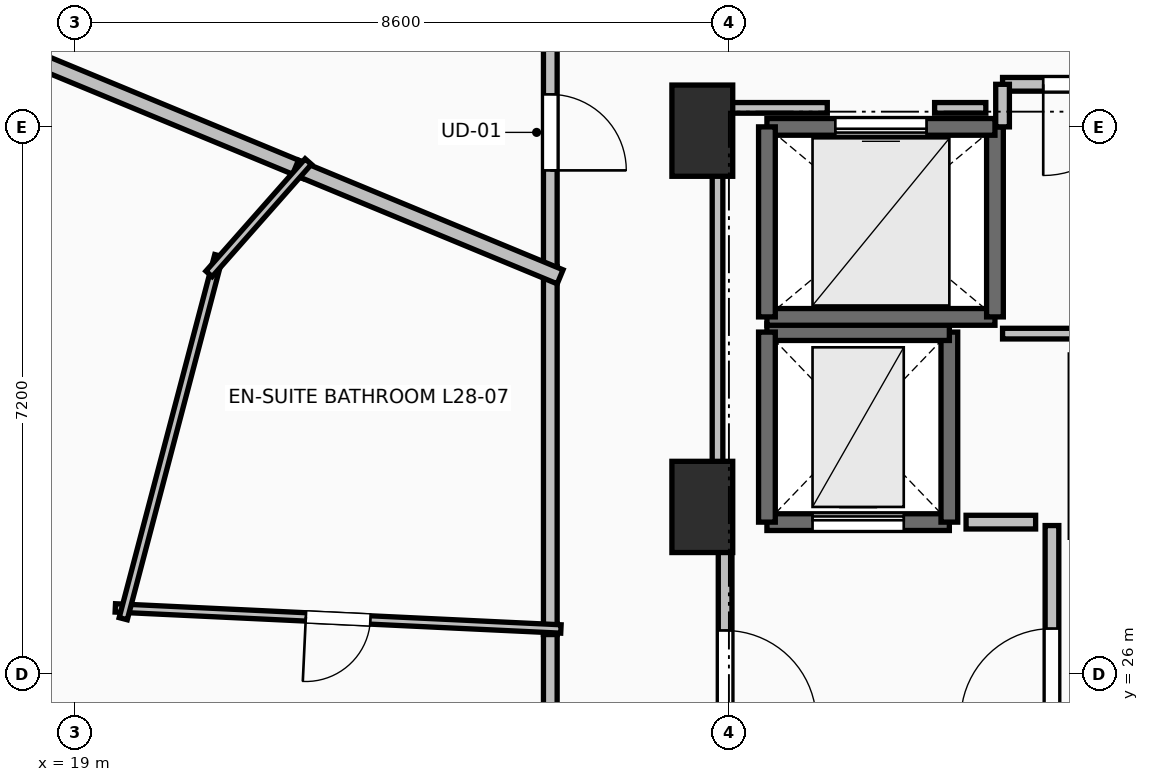
"""IFC4 building model, lengths in metres.
Left out: names, types, materials, properties, quantities, classifications, styles, units other than length and angle.
Written with IfcOpenShell. Run it as: python <this file> out.ifc"""

import sys

from ifc_helpers import new_model, si_unit, direction, frame, frame_2d, origin, origin_2d, place, context, subcontext, project, spatial, rectangle, extrude, element, fill, save


model = new_model("IFC4")
c1 = context("Model", 3, precision=1e-05, world=origin(), true_north=direction((0.0, 1.0)))
c2 = subcontext(c1, "Body", "Model", "MODEL_VIEW")
j1 = project(units=[si_unit("LENGTHUNIT", "METRE"), si_unit("PLANEANGLEUNIT", "RADIAN")], contexts=[c1])
p1 = place(None, origin())
s1 = spatial("IfcSite", under=j1, at=p1, CompositionType="ELEMENT")
p2 = place(p1, origin())
s2 = spatial("IfcBuilding", under=s1, at=p2, CompositionType="ELEMENT")
p3 = place(p2, frame((0.0, 0.0, 106.8)))
s3 = spatial("IfcBuildingStorey", under=s2, at=p3, CompositionType="ELEMENT", Elevation=106.8)
for number, where, z_axis, x_axis in (
    (1, (27.25, 28.2, 0.0), (0.0, 0.0, 1.0), (1.0, 0.0, 0.0)),
    (2, (27.25, 33.15, 0.0), (0.0, 0.0, 1.0), (1.0, 0.0, 0.0)),
):
    element("IfcColumn", number, at=place(p3, frame(where, z_axis=z_axis, x_axis=x_axis)), inside=s3, PredefinedType="PILASTER", context=c2, shape_type="SweptSolid", body=[
        extrude(rectangle(XDim=0.8, YDim=1.2, at=origin_2d()), origin(), (0.0, 0.0, 1.0), 3.5),
    ])
p4 = place(p3, frame((28.1, 28.0, 0.0), z_axis=(0.0, 0.0, 1.0), x_axis=(1.0, 0.0, 0.0)))
e3 = element("IfcWall", 3, at=p4, inside=s3, PredefinedType="SHEAR", context=c2, shape_type="SweptSolid", body=[
    extrude(rectangle(XDim=2.4, YDim=0.22, at=frame_2d((1.2, 0.0))), origin(), (0.0, 0.0, 1.0), 3.24),
])
p5 = place(p4, frame((0.6, 0.0, 0.0)))
e4 = element("IfcOpeningElement", 4, at=p5, cuts=e3, PredefinedType="OPENING", context=c2, shape_type="SweptSolid", body=[
    extrude(rectangle(XDim=1.2, YDim=2.2, at=frame_2d((0.6, 1.1))), frame((0.0, 0.125, 0.0), z_axis=(0.0, -1.0, 0.0), x_axis=(1.0, 0.0, 0.0)), (0.0, 0.0, 1.0), 0.25),
])
p6 = place(p3, frame((30.5, 28.0, 0.0), z_axis=(0.0, 0.0, 1.0), x_axis=(0.0, 1.0, 0.0)))
e5 = element("IfcWall", 5, at=p6, inside=s3, PredefinedType="SHEAR", context=c2, shape_type="SweptSolid", body=[
    extrude(rectangle(XDim=2.5, YDim=0.22, at=frame_2d((1.25, 0.0))), origin(), (0.0, 0.0, 1.0), 3.24),
])
p7 = place(p3, frame((30.5, 30.5, 0.0), z_axis=(0.0, 0.0, 1.0), x_axis=(-1.0, 0.0, 0.0)))
e6 = element("IfcWall", 6, at=p7, inside=s3, PredefinedType="SHEAR", context=c2, shape_type="SweptSolid", body=[
    extrude(rectangle(XDim=2.4, YDim=0.22, at=frame_2d((1.2, 0.0))), origin(), (0.0, 0.0, 1.0), 3.24),
])
p8 = place(p3, frame((28.1, 30.5, 0.0), z_axis=(0.0, 0.0, 1.0), x_axis=(0.0, -1.0, 0.0)))
e7 = element("IfcWall", 7, at=p8, inside=s3, PredefinedType="SHEAR", context=c2, shape_type="SweptSolid", body=[
    extrude(rectangle(XDim=2.5, YDim=0.22, at=frame_2d((1.25, 0.0))), origin(), (0.0, 0.0, 1.0), 3.24),
])
p9 = place(p3, frame((28.1, 30.7, 0.0), z_axis=(0.0, 0.0, 1.0), x_axis=(1.0, 0.0, 0.0)))
e8 = element("IfcWall", 8, at=p9, inside=s3, PredefinedType="SOLIDWALL", context=c2, shape_type="SweptSolid", body=[
    extrude(rectangle(XDim=3.0, YDim=0.22, at=frame_2d((1.5, 0.0))), origin(), (0.0, 0.0, 1.0), 3.24),
])
p10 = place(p3, frame((31.1, 30.7, 0.0), z_axis=(0.0, 0.0, 1.0), x_axis=(0.0, 1.0, 0.0)))
e9 = element("IfcWall", 9, at=p10, inside=s3, PredefinedType="SOLIDWALL", context=c2, shape_type="SweptSolid", body=[
    extrude(rectangle(XDim=2.5, YDim=0.22, at=frame_2d((1.25, 0.0))), origin(), (0.0, 0.0, 1.0), 3.24),
])
p11 = place(p3, frame((31.1, 33.2, 0.0), z_axis=(0.0, 0.0, 1.0), x_axis=(-1.0, 0.0, 0.0)))
e10 = element("IfcWall", 10, at=p11, inside=s3, PredefinedType="SOLIDWALL", context=c2, shape_type="SweptSolid", body=[
    extrude(rectangle(XDim=3.0, YDim=0.22, at=frame_2d((1.5, 0.0))), origin(), (0.0, 0.0, 1.0), 3.24),
])
p12 = place(p11, frame((0.9, 0.0, 0.0)))
e11 = element("IfcOpeningElement", 11, at=p12, cuts=e10, PredefinedType="OPENING", context=c2, shape_type="SweptSolid", body=[
    extrude(rectangle(XDim=1.2, YDim=2.2, at=frame_2d((0.6, 1.1))), frame((0.0, 0.125, 0.0), z_axis=(0.0, -1.0, 0.0), x_axis=(1.0, 0.0, 0.0)), (0.0, 0.0, 1.0), 0.25),
])
p13 = place(p3, frame((28.1, 33.2, 0.0), z_axis=(0.0, 0.0, 1.0), x_axis=(0.0, -1.0, 0.0)))
e12 = element("IfcWall", 12, at=p13, inside=s3, PredefinedType="SOLIDWALL", context=c2, shape_type="SweptSolid", body=[
    extrude(rectangle(XDim=2.5, YDim=0.22, at=frame_2d((1.25, 0.0))), origin(), (0.0, 0.0, 1.0), 3.24),
])
p14 = place(p3, frame((31.85, 24.045, 0.0), z_axis=(0.0, 0.0, 1.0), x_axis=(0.0, 1.0, 0.0)))
e13 = element("IfcWall", 13, at=p14, inside=s3, PredefinedType="PARTITIONING", context=c2, shape_type="SweptSolid", body=[
    extrude(rectangle(XDim=3.91, YDim=0.18, at=frame_2d((1.955, 0.0))), origin(), (0.0, 0.0, 1.0), 3.24),
])
p15 = place(p14, frame((1.355, 0.0, 0.0)))
e14 = element("IfcOpeningElement", 14, at=p15, cuts=e13, PredefinedType="OPENING", context=c2, shape_type="SweptSolid", body=[
    extrude(rectangle(XDim=1.2, YDim=2.15, at=frame_2d((0.6, 1.075))), frame((0.0, 0.105, 0.0), z_axis=(0.0, -1.0, 0.0), x_axis=(1.0, 0.0, 0.0)), (0.0, 0.0, 1.0), 0.21),
])
p16 = place(p3, frame((27.55, 28.0, 0.0), z_axis=(0.0, 0.0, 1.0), x_axis=(0.0, -1.0, 0.0)))
e15 = element("IfcWall", 15, at=p16, inside=s3, PredefinedType="PARTITIONING", context=c2, shape_type="SweptSolid", body=[
    extrude(rectangle(XDim=4.05, YDim=0.18, at=frame_2d((2.025, 0.0))), origin(), (0.0, 0.0, 1.0), 3.24),
])
p17 = place(p16, frame((1.425, 0.0, 0.0)))
e16 = element("IfcOpeningElement", 16, at=p17, cuts=e15, PredefinedType="OPENING", context=c2, shape_type="SweptSolid", body=[
    extrude(rectangle(XDim=1.2, YDim=2.15, at=frame_2d((0.6, 1.075))), frame((0.0, 0.105, 0.0), z_axis=(0.0, -1.0, 0.0), x_axis=(1.0, 0.0, 0.0)), (0.0, 0.0, 1.0), 0.21),
])
p18 = place(p3, frame((33.47, 33.76, 0.0), z_axis=(0.0, 0.0, 1.0), x_axis=(-1.0, 0.0, 0.0)))
e17 = element("IfcWall", 17, at=p18, inside=s3, PredefinedType="PARTITIONING", context=c2, shape_type="SweptSolid", body=[
    extrude(rectangle(XDim=2.27, YDim=0.18, at=frame_2d((1.135, 0.0))), origin(), (0.0, 0.0, 1.0), 3.24),
])
p19 = place(p18, frame((0.535, 0.0, 0.0)))
e18 = element("IfcOpeningElement", 18, at=p19, cuts=e17, PredefinedType="OPENING", context=c2, shape_type="SweptSolid", body=[
    extrude(rectangle(XDim=1.2, YDim=2.15, at=frame_2d((0.6, 1.075))), frame((0.0, 0.105, 0.0), z_axis=(0.0, -1.0, 0.0), x_axis=(1.0, 0.0, 0.0)), (0.0, 0.0, 1.0), 0.21),
])
p20 = place(p3, frame((31.2, 33.76, 0.0), z_axis=(0.0, 0.0, 1.0), x_axis=(0.0, -1.0, 0.0)))
e19 = element("IfcWall", 19, at=p20, inside=s3, PredefinedType="PARTITIONING", context=c2, shape_type="SweptSolid", body=[
    extrude(rectangle(XDim=0.56, YDim=0.18, at=frame_2d((0.28, 0.0))), origin(), (0.0, 0.0, 1.0), 3.24),
])
p21 = place(p3, frame((25.25, 35.034, 0.0), z_axis=(0.0, 0.0, 1.0), x_axis=(0.0, -1.0, 0.0)))
e20 = element("IfcWall", 20, at=p21, inside=s3, PredefinedType="PARTITIONING", context=c2, shape_type="SweptSolid", body=[
    extrude(rectangle(XDim=3.813, YDim=0.18, at=frame_2d((1.906, 0.0))), origin(), (0.0, 0.0, 1.0), 2.432),
])
p22 = place(p21, frame((1.406, 0.0, 0.0)))
e21 = element("IfcOpeningElement", 21, at=p22, cuts=e20, PredefinedType="OPENING", context=c2, shape_type="SweptSolid", body=[
    extrude(rectangle(XDim=1.0, YDim=2.15, at=frame_2d((0.5, 1.075))), frame((0.0, 0.105, 0.0), z_axis=(0.0, -1.0, 0.0), x_axis=(1.0, 0.0, 0.0)), (0.0, 0.0, 1.0), 0.21),
])
p23 = place(p3, frame((25.25, 26.661, 0.0), z_axis=(0.0, 0.0, 1.0), x_axis=(0.0, -1.0, 0.0)))
e22 = element("IfcWall", 22, at=p23, inside=s3, PredefinedType="PARTITIONING", context=c2, shape_type="SweptSolid", body=[
    extrude(rectangle(XDim=6.007, YDim=0.18, at=frame_2d((3.003, 0.0))), origin(), (0.0, 0.0, 1.0), 3.24),
])
p24 = place(p23, frame((2.479, 0.0, 0.0)))
e23 = element("IfcOpeningElement", 23, at=p24, cuts=e22, PredefinedType="OPENING", context=c2, shape_type="SweptSolid", body=[
    extrude(rectangle(XDim=1.05, YDim=2.2, at=frame_2d((0.525, 1.1))), frame((0.0, 0.105, 0.0), z_axis=(0.0, -1.0, 0.0), x_axis=(1.0, 0.0, 0.0)), (0.0, 0.0, 1.0), 0.21),
])
p25 = place(p3, frame((25.25, 31.361, 0.0), z_axis=(0.0, 0.0, 1.0), x_axis=(0.0, -1.0, 0.0)))
e24 = element("IfcWall", 24, at=p25, inside=s3, PredefinedType="PARTITIONING", context=c2, shape_type="SweptSolid", body=[
    extrude(rectangle(XDim=4.84, YDim=0.18, at=frame_2d((2.42, 0.0))), origin(), (0.0, 0.0, 1.0), 2.432),
])
p26 = place(p3, frame((15.089, 35.49, 0.0), z_axis=(0.0, 0.0, 1.0), x_axis=(0.923888472039, -0.382661849723, 0.0)))
e25 = element("IfcWall", 25, at=p26, inside=s3, PredefinedType="PARTITIONING", context=c2, shape_type="SweptSolid", body=[
    extrude(rectangle(XDim=7.51, YDim=0.2, at=frame_2d((3.755, 0.0))), origin(), (0.0, 0.0, 1.0), 2.677),
])
p27 = place(p3, frame((21.899, 32.669, 0.0), z_axis=(0.0, 0.0, 1.0), x_axis=(0.923843852071, -0.382769561211, 0.0)))
e26 = element("IfcWall", 26, at=p27, inside=s3, PredefinedType="PARTITIONING", context=c2, shape_type="SweptSolid", body=[
    extrude(rectangle(XDim=3.768, YDim=0.2, at=frame_2d((1.884, 0.0))), origin(), (0.0, 0.0, 1.0), 2.886),
])
p28 = place(p3, frame((25.39, 26.594, 0.0), z_axis=(0.0, 0.0, 1.0), x_axis=(-0.998884920498, 0.047211392719, 0.0)))
e27 = element("IfcWall", 27, at=p28, inside=s3, PredefinedType="PARTITIONING", context=c2, shape_type="SweptSolid", body=[
    extrude(rectangle(XDim=5.869, YDim=0.11, at=frame_2d((2.935, 0.0))), origin(), (0.0, 0.0, 1.0), 2.432),
])
p29 = place(p28, frame((2.51, 0.0, 0.0)))
e28 = element("IfcOpeningElement", 28, at=p29, cuts=e27, PredefinedType="OPENING", context=c2, shape_type="SweptSolid", body=[
    extrude(rectangle(XDim=0.85, YDim=2.1, at=frame_2d((0.425, 1.05))), frame((0.0, 0.07, 0.0), z_axis=(0.0, -1.0, 0.0), x_axis=(1.0, 0.0, 0.0)), (0.0, 0.0, 1.0), 0.14),
])
p30 = place(p3, frame((19.631, 26.729, 0.0), z_axis=(0.0, 0.0, 1.0), x_axis=(0.254541956306, 0.967061731473, 0.0)))
e29 = element("IfcWall", 29, at=p30, inside=s3, PredefinedType="PARTITIONING", context=c2, shape_type="SweptSolid", body=[
    extrude(rectangle(XDim=4.939, YDim=0.11, at=frame_2d((2.47, 0.0))), origin(), (0.0, 0.0, 1.0), 2.432),
])
p31 = place(p3, frame((20.76, 31.266, 0.0), z_axis=(0.0, 0.0, 1.0), x_axis=(0.662047420969, 0.749461948593, 0.0)))
e30 = element("IfcWall", 30, at=p31, inside=s3, PredefinedType="PARTITIONING", context=c2, shape_type="SweptSolid", body=[
    extrude(rectangle(XDim=1.972, YDim=0.11, at=frame_2d((0.986, 0.0))), origin(), (0.0, 0.0, 1.0), 3.24),
])
p32 = place(p3, frame((31.635, 28.0, 0.0), z_axis=(0.0, 0.0, 1.0), x_axis=(-1.0, 0.0, 0.0)))
e31 = element("IfcWall", 31, at=p32, inside=s3, PredefinedType="PARTITIONING", context=c2, shape_type="SweptSolid", body=[
    extrude(rectangle(XDim=0.915, YDim=0.18, at=frame_2d((0.458, 0.0))), origin(), (0.0, 0.0, 1.0), 3.24),
])
p33 = place(p3, frame((31.2, 30.48, 0.0), z_axis=(0.0, 0.0, 1.0), x_axis=(1.0, 0.0, 0.0)))
e32 = element("IfcWall", 32, at=p33, inside=s3, PredefinedType="PARTITIONING", context=c2, shape_type="SweptSolid", body=[
    extrude(rectangle(XDim=2.05, YDim=0.14, at=frame_2d((1.025, 0.0))), origin(), (0.0, 0.0, 1.0), 3.24),
])
p34 = place(p3, frame((27.45, 28.196, 0.0), z_axis=(0.0, 0.0, 1.0), x_axis=(0.0, 1.0, 0.0)))
e33 = element("IfcWall", 33, at=p34, inside=s3, PredefinedType="PARTITIONING", context=c2, shape_type="SweptSolid", body=[
    extrude(rectangle(XDim=5.254, YDim=0.14, at=frame_2d((2.627, 0.0))), origin(), (0.0, 0.0, 1.0), 2.432),
])
p35 = place(p3, frame((27.45, 33.45, 0.0), z_axis=(0.0, 0.0, 1.0), x_axis=(1.0, 0.0, 0.0)))
e34 = element("IfcWall", 34, at=p35, inside=s3, PredefinedType="PARTITIONING", context=c2, shape_type="SweptSolid", body=[
    extrude(rectangle(XDim=1.444, YDim=0.14, at=frame_2d((0.722, 0.0))), origin(), (0.0, 0.0, 1.0), 2.432),
])
p36 = place(p3, frame((30.306, 33.45, 0.0), z_axis=(0.0, 0.0, 1.0), x_axis=(1.0, 0.0, 0.0)))
e35 = element("IfcWall", 35, at=p36, inside=s3, PredefinedType="PARTITIONING", context=c2, shape_type="SweptSolid", body=[
    extrude(rectangle(XDim=0.674, YDim=0.14, at=frame_2d((0.337, 0.0))), origin(), (0.0, 0.0, 1.0), 3.24),
])
p37 = place(p5, origin())
e36 = element("IfcDoor", 36, at=p37, inside=s3, OperationType="SLIDING_TO_LEFT", PredefinedType="DOOR", context=c2, shape_type="SweptSolid", body=[
    extrude(rectangle(XDim=1.2, YDim=2.2, at=frame_2d((0.6, 1.1))), frame((0.0, 0.025, 0.0), z_axis=(0.0, -1.0, 0.0), x_axis=(1.0, 0.0, 0.0)), (0.0, 0.0, 1.0), 0.05),
])
fill(e4, e36)
p38 = place(p12, origin())
e37 = element("IfcDoor", 37, at=p38, inside=s3, OperationType="SLIDING_TO_LEFT", PredefinedType="DOOR", context=c2, shape_type="SweptSolid", body=[
    extrude(rectangle(XDim=1.2, YDim=2.2, at=frame_2d((0.6, 1.1))), frame((0.0, 0.025, 0.0), z_axis=(0.0, -1.0, 0.0), x_axis=(1.0, 0.0, 0.0)), (0.0, 0.0, 1.0), 0.05),
])
fill(e11, e37)
p39 = place(p15, origin())
e38 = element("IfcDoor", 38, at=p39, inside=s3, OperationType="SINGLE_SWING_LEFT", PredefinedType="DOOR", context=c2, shape_type="SweptSolid", body=[
    extrude(rectangle(XDim=1.2, YDim=2.15, at=frame_2d((0.6, 1.075))), frame((0.0, 0.025, 0.0), z_axis=(0.0, -1.0, 0.0), x_axis=(1.0, 0.0, 0.0)), (0.0, 0.0, 1.0), 0.05),
])
fill(e14, e38)
p40 = place(p17, origin())
e39 = element("IfcDoor", 39, at=p40, inside=s3, OperationType="SINGLE_SWING_RIGHT", PredefinedType="DOOR", context=c2, shape_type="SweptSolid", body=[
    extrude(rectangle(XDim=1.2, YDim=2.15, at=frame_2d((0.6, 1.075))), frame((0.0, 0.025, 0.0), z_axis=(0.0, -1.0, 0.0), x_axis=(1.0, 0.0, 0.0)), (0.0, 0.0, 1.0), 0.05),
])
fill(e16, e39)
p41 = place(p19, origin())
e40 = element("IfcDoor", 40, at=p41, inside=s3, OperationType="SINGLE_SWING_RIGHT", PredefinedType="DOOR", context=c2, shape_type="SweptSolid", body=[
    extrude(rectangle(XDim=1.2, YDim=2.15, at=frame_2d((0.6, 1.075))), frame((0.0, 0.025, 0.0), z_axis=(0.0, -1.0, 0.0), x_axis=(1.0, 0.0, 0.0)), (0.0, 0.0, 1.0), 0.05),
])
fill(e18, e40)
p42 = place(p22, origin())
e41 = element("IfcDoor", 41, at=p42, inside=s3, OperationType="SINGLE_SWING_RIGHT", PredefinedType="DOOR", context=c2, shape_type="SweptSolid", body=[
    extrude(rectangle(XDim=1.0, YDim=2.15, at=frame_2d((0.5, 1.075))), frame((0.0, 0.025, 0.0), z_axis=(0.0, -1.0, 0.0), x_axis=(1.0, 0.0, 0.0)), (0.0, 0.0, 1.0), 0.05),
])
fill(e21, e41)
p43 = place(p29, origin())
e42 = element("IfcDoor", 42, at=p43, inside=s3, OperationType="SINGLE_SWING_RIGHT", PredefinedType="DOOR", context=c2, shape_type="SweptSolid", body=[
    extrude(rectangle(XDim=0.85, YDim=2.1, at=frame_2d((0.425, 1.05))), frame((0.0, 0.025, 0.0), z_axis=(0.0, -1.0, 0.0), x_axis=(1.0, 0.0, 0.0)), (0.0, 0.0, 1.0), 0.05),
])
fill(e28, e42)
save(model, sys.argv[1])
